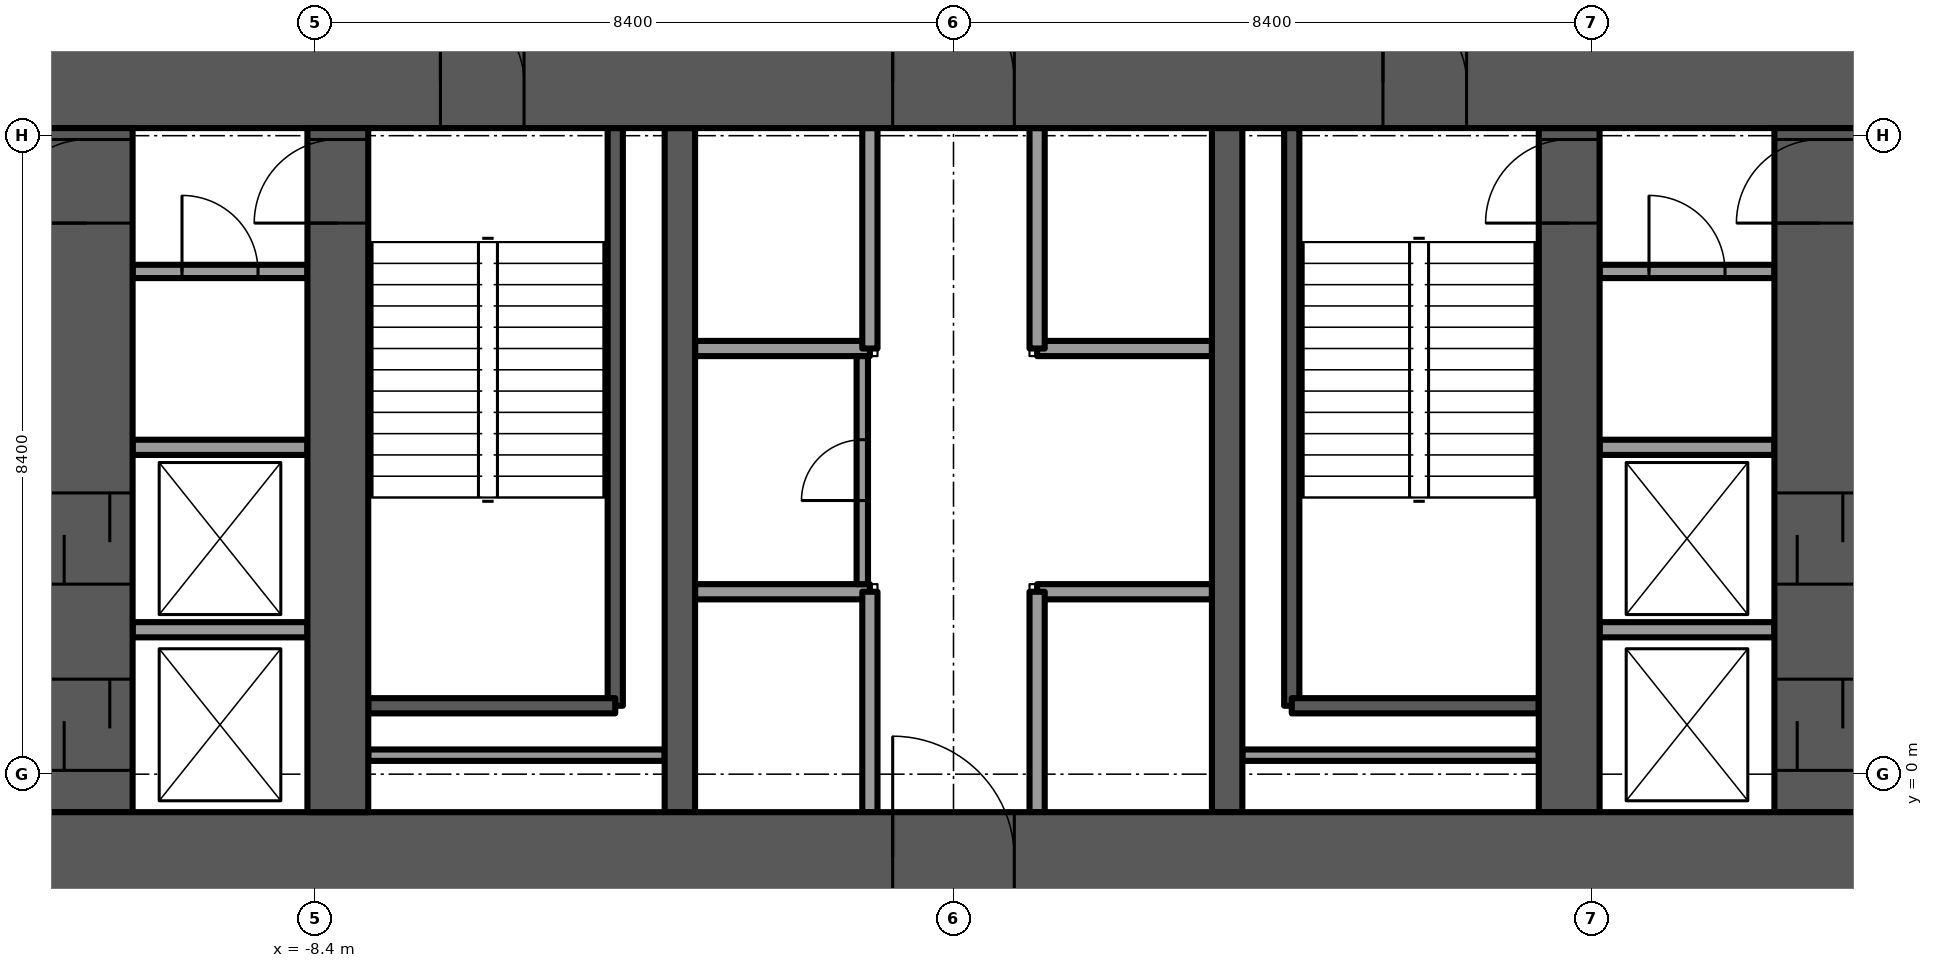
"""IFC4 building model, lengths in metres.
Left out: names, types, materials, properties, quantities, classifications, styles, units other than length and angle.
Written with IfcOpenShell. Run it as: python <this file> out.ifc"""

import sys

from ifc_helpers import new_model, si_unit, direction, frame, frame_2d, origin, place, context, subcontext, project, spatial, rectangle, extrude, element, fill, save


model = new_model("IFC4")
c1 = context("Model", 3, precision=1e-05, world=origin(), true_north=direction((0.0, 1.0)))
c2 = subcontext(c1, "Body", "Model", "MODEL_VIEW")
j1 = project(units=[si_unit("LENGTHUNIT", "METRE"), si_unit("PLANEANGLEUNIT", "RADIAN")], contexts=[c1])
p1 = place(None, origin())
s1 = spatial("IfcSite", under=j1, at=p1, CompositionType="ELEMENT")
p2 = place(p1, origin())
s2 = spatial("IfcBuilding", under=s1, at=p2, CompositionType="ELEMENT")
p3 = place(p2, frame((0.0, 0.0, 23.5)))
s3 = spatial("IfcBuildingStorey", under=s2, at=p3, CompositionType="ELEMENT", Elevation=23.5)
p4 = place(p3, frame((-12.0, -1.1, -0.3), z_axis=(0.0, 0.0, 1.0), x_axis=(1.0, 0.0, 0.0)))
e1 = element("IfcWall", 1, at=p4, inside=s3, PredefinedType="SHEAR", context=c2, shape_type="SweptSolid", body=[
    extrude(rectangle(XDim=24.0, YDim=1.2, at=frame_2d((12.0, 0.0))), origin(), (0.0, 0.0, 1.0), 4.5),
])
p5 = place(p4, frame((11.2, 0.0, 0.0)))
e2 = element("IfcOpeningElement", 2, at=p5, cuts=e1, PredefinedType="OPENING", context=c2, shape_type="SweptSolid", body=[
    extrude(rectangle(XDim=1.6, YDim=2.1, at=frame_2d((0.8, 1.05))), frame((0.0, 0.6, 0.0), z_axis=(0.0, -1.0, 0.0), x_axis=(1.0, 0.0, 0.0)), (0.0, 0.0, 1.0), 1.2),
])
p6 = place(p3, frame((-12.0, 9.1, -0.3), z_axis=(0.0, 0.0, 1.0), x_axis=(1.0, 0.0, 0.0)))
e3 = element("IfcWall", 3, at=p6, inside=s3, PredefinedType="SHEAR", context=c2, shape_type="SweptSolid", body=[
    extrude(rectangle(XDim=24.0, YDim=1.2, at=frame_2d((12.0, 0.0))), origin(), (0.0, 0.0, 1.0), 4.5),
])
p7 = place(p6, frame((11.2, 0.0, 0.0)))
e4 = element("IfcOpeningElement", 4, at=p7, cuts=e3, PredefinedType="OPENING", context=c2, shape_type="SweptSolid", body=[
    extrude(rectangle(XDim=1.6, YDim=2.1, at=frame_2d((0.8, 1.05))), frame((0.0, 0.6, 0.0), z_axis=(0.0, -1.0, 0.0), x_axis=(1.0, 0.0, 0.0)), (0.0, 0.0, 1.0), 1.2),
])
p8 = place(p6, frame((5.25, 0.0, 0.0)))
e5 = element("IfcOpeningElement", 5, at=p8, cuts=e3, PredefinedType="OPENING", context=c2, shape_type="SweptSolid", body=[
    extrude(rectangle(XDim=1.1, YDim=2.1, at=frame_2d((0.55, 1.05))), frame((0.0, 0.6, 0.0), z_axis=(0.0, -1.0, 0.0), x_axis=(1.0, 0.0, 0.0)), (0.0, 0.0, 1.0), 1.2),
])
p9 = place(p6, frame((17.65, 0.0, 0.0)))
e6 = element("IfcOpeningElement", 6, at=p9, cuts=e3, PredefinedType="OPENING", context=c2, shape_type="SweptSolid", body=[
    extrude(rectangle(XDim=1.1, YDim=2.1, at=frame_2d((0.55, 1.05))), frame((0.0, 0.6, 0.0), z_axis=(0.0, -1.0, 0.0), x_axis=(1.0, 0.0, 0.0)), (0.0, 0.0, 1.0), 1.2),
])
p10 = place(p3, frame((-8.1, -0.5, -0.3), z_axis=(0.0, 0.0, 1.0), x_axis=(0.0, 1.0, 0.0)))
e7 = element("IfcWall", 7, at=p10, inside=s3, PredefinedType="SHEAR", context=c2, shape_type="SweptSolid", body=[
    extrude(rectangle(XDim=9.0, YDim=0.8, at=frame_2d((4.5, 0.0))), origin(), (0.0, 0.0, 1.0), 4.5),
])
p11 = place(p10, frame((7.75, 0.0, 0.0)))
e8 = element("IfcOpeningElement", 8, at=p11, cuts=e7, PredefinedType="OPENING", context=c2, shape_type="SweptSolid", body=[
    extrude(rectangle(XDim=1.1, YDim=2.1, at=frame_2d((0.55, 1.05))), frame((0.0, 0.4, 0.0), z_axis=(0.0, -1.0, 0.0), x_axis=(1.0, 0.0, 0.0)), (0.0, 0.0, 1.0), 0.8),
])
p12 = place(p3, frame((8.1, -0.5, -0.3), z_axis=(0.0, 0.0, 1.0), x_axis=(0.0, 1.0, 0.0)))
e9 = element("IfcWall", 9, at=p12, inside=s3, PredefinedType="SHEAR", context=c2, shape_type="SweptSolid", body=[
    extrude(rectangle(XDim=9.0, YDim=0.8, at=frame_2d((4.5, 0.0))), origin(), (0.0, 0.0, 1.0), 4.5),
])
p13 = place(p12, frame((7.75, 0.0, 0.0)))
e10 = element("IfcOpeningElement", 10, at=p13, cuts=e9, PredefinedType="OPENING", context=c2, shape_type="SweptSolid", body=[
    extrude(rectangle(XDim=1.1, YDim=2.1, at=frame_2d((0.55, 1.05))), frame((0.0, 0.4, 0.0), z_axis=(0.0, -1.0, 0.0), x_axis=(1.0, 0.0, 0.0)), (0.0, 0.0, 1.0), 0.8),
])
for number, where, z_axis, x_axis in (
    (11, (-3.6, -0.5, -0.3), (0.0, 0.0, 1.0), (0.0, 1.0, 0.0)),
    (12, (3.6, -0.5, -0.3), (0.0, 0.0, 1.0), (0.0, 1.0, 0.0)),
):
    element("IfcWall", number, at=place(p3, frame(where, z_axis=z_axis, x_axis=x_axis)), inside=s3, PredefinedType="SHEAR", context=c2, shape_type="SweptSolid", body=[
        extrude(rectangle(XDim=9.0, YDim=0.4, at=frame_2d((4.5, 0.0))), origin(), (0.0, 0.0, 1.0), 4.5),
    ])
p14 = place(p3, frame((-11.4, -0.5, -0.3), z_axis=(0.0, 0.0, 1.0), x_axis=(0.0, 1.0, 0.0)))
e13 = element("IfcWall", 13, at=p14, inside=s3, PredefinedType="SHEAR", context=c2, shape_type="SweptSolid", body=[
    extrude(rectangle(XDim=9.0, YDim=1.2, at=frame_2d((4.5, 0.0))), origin(), (0.0, 0.0, 1.0), 4.5),
])
p15 = place(p14, frame((7.75, 0.0, 0.0)))
e14 = element("IfcOpeningElement", 14, at=p15, cuts=e13, PredefinedType="OPENING", context=c2, shape_type="SweptSolid", body=[
    extrude(rectangle(XDim=1.1, YDim=2.1, at=frame_2d((0.55, 1.05))), frame((0.0, 0.6, 0.0), z_axis=(0.0, -1.0, 0.0), x_axis=(1.0, 0.0, 0.0)), (0.0, 0.0, 1.0), 1.2),
])
p16 = place(p14, frame((0.55, 0.0, 0.0)))
e15 = element("IfcOpeningElement", 15, at=p16, cuts=e13, PredefinedType="OPENING", context=c2, shape_type="SweptSolid", body=[
    extrude(rectangle(XDim=1.2, YDim=2.1, at=frame_2d((0.6, 1.05))), frame((0.0, 0.6, 0.0), z_axis=(0.0, -1.0, 0.0), x_axis=(1.0, 0.0, 0.0)), (0.0, 0.0, 1.0), 1.2),
])
p17 = place(p14, frame((3.0, 0.0, 0.0)))
e16 = element("IfcOpeningElement", 16, at=p17, cuts=e13, PredefinedType="OPENING", context=c2, shape_type="SweptSolid", body=[
    extrude(rectangle(XDim=1.2, YDim=2.1, at=frame_2d((0.6, 1.05))), frame((0.0, 0.6, 0.0), z_axis=(0.0, -1.0, 0.0), x_axis=(1.0, 0.0, 0.0)), (0.0, 0.0, 1.0), 1.2),
])
p18 = place(p3, frame((11.4, -0.5, -0.3), z_axis=(0.0, 0.0, 1.0), x_axis=(0.0, 1.0, 0.0)))
e17 = element("IfcWall", 17, at=p18, inside=s3, PredefinedType="SHEAR", context=c2, shape_type="SweptSolid", body=[
    extrude(rectangle(XDim=9.0, YDim=1.2, at=frame_2d((4.5, 0.0))), origin(), (0.0, 0.0, 1.0), 4.5),
])
p19 = place(p18, frame((7.75, 0.0, 0.0)))
e18 = element("IfcOpeningElement", 18, at=p19, cuts=e17, PredefinedType="OPENING", context=c2, shape_type="SweptSolid", body=[
    extrude(rectangle(XDim=1.1, YDim=2.1, at=frame_2d((0.55, 1.05))), frame((0.0, 0.6, 0.0), z_axis=(0.0, -1.0, 0.0), x_axis=(1.0, 0.0, 0.0)), (0.0, 0.0, 1.0), 1.2),
])
p20 = place(p18, frame((0.55, 0.0, 0.0)))
e19 = element("IfcOpeningElement", 19, at=p20, cuts=e17, PredefinedType="OPENING", context=c2, shape_type="SweptSolid", body=[
    extrude(rectangle(XDim=1.2, YDim=2.1, at=frame_2d((0.6, 1.05))), frame((0.0, 0.6, 0.0), z_axis=(0.0, -1.0, 0.0), x_axis=(1.0, 0.0, 0.0)), (0.0, 0.0, 1.0), 1.2),
])
p21 = place(p18, frame((3.0, 0.0, 0.0)))
e20 = element("IfcOpeningElement", 20, at=p21, cuts=e17, PredefinedType="OPENING", context=c2, shape_type="SweptSolid", body=[
    extrude(rectangle(XDim=1.2, YDim=2.1, at=frame_2d((0.6, 1.05))), frame((0.0, 0.6, 0.0), z_axis=(0.0, -1.0, 0.0), x_axis=(1.0, 0.0, 0.0)), (0.0, 0.0, 1.0), 1.2),
])
for number, where, z_axis, x_axis in (
    (21, (-3.4, 2.4, 0.0), (0.0, 0.0, 1.0), (1.0, 0.0, 0.0)),
    (22, (-3.4, 5.6, 0.0), (0.0, 0.0, 1.0), (1.0, 0.0, 0.0)),
    (23, (1.1, 2.4, 0.0), (0.0, 0.0, 1.0), (1.0, 0.0, 0.0)),
    (24, (1.1, 5.6, 0.0), (0.0, 0.0, 1.0), (1.0, 0.0, 0.0)),
):
    element("IfcWall", number, at=place(p3, frame(where, z_axis=z_axis, x_axis=x_axis)), inside=s3, PredefinedType="PARTITIONING", context=c2, shape_type="SweptSolid", body=[
        extrude(rectangle(XDim=2.3, YDim=0.2, at=frame_2d((1.15, 0.0))), origin(), (0.0, 0.0, 1.0), 4.2),
    ])
for number, where, z_axis, x_axis in (
    (25, (-1.1, -0.5, 0.0), (0.0, 0.0, 1.0), (0.0, 1.0, 0.0)),
    (26, (1.1, -0.5, 0.0), (0.0, 0.0, 1.0), (0.0, 1.0, 0.0)),
    (27, (-1.1, 5.6, 0.0), (0.0, 0.0, 1.0), (0.0, 1.0, 0.0)),
    (28, (1.1, 5.6, 0.0), (0.0, 0.0, 1.0), (0.0, 1.0, 0.0)),
):
    element("IfcWall", number, at=place(p3, frame(where, z_axis=z_axis, x_axis=x_axis)), inside=s3, PredefinedType="PARTITIONING", context=c2, shape_type="SweptSolid", body=[
        extrude(rectangle(XDim=2.9, YDim=0.2, at=frame_2d((1.45, 0.0))), origin(), (0.0, 0.0, 1.0), 4.2),
    ])
p22 = place(p3, frame((-4.45, 0.9, -0.3), z_axis=(0.0, 0.0, 1.0), x_axis=(0.0, 1.0, 0.0)))
e29 = element("IfcWall", 29, at=p22, inside=s3, PredefinedType="SOLIDWALL", context=c2, shape_type="SweptSolid", body=[
    extrude(rectangle(XDim=7.6, YDim=0.2, at=frame_2d((3.8, 0.0))), origin(), (0.0, 0.0, 1.0), 4.5),
])
p23 = place(p3, frame((-7.7, 0.9, -0.3), z_axis=(0.0, 0.0, 1.0), x_axis=(1.0, 0.0, 0.0)))
e30 = element("IfcWall", 30, at=p23, inside=s3, PredefinedType="SOLIDWALL", context=c2, shape_type="SweptSolid", body=[
    extrude(rectangle(XDim=3.25, YDim=0.2, at=frame_2d((1.625, 0.0))), origin(), (0.0, 0.0, 1.0), 4.5),
])
p24 = place(p3, frame((-7.7, 0.25, 0.0), z_axis=(0.0, 0.0, 1.0), x_axis=(1.0, 0.0, 0.0)))
e31 = element("IfcWall", 31, at=p24, inside=s3, PredefinedType="PARTITIONING", context=c2, shape_type="SweptSolid", body=[
    extrude(rectangle(XDim=3.9, YDim=0.15, at=frame_2d((1.95, 0.0))), origin(), (0.0, 0.0, 1.0), 4.2),
])
p25 = place(p3, frame((4.45, 0.9, -0.3), z_axis=(0.0, 0.0, 1.0), x_axis=(0.0, 1.0, 0.0)))
e32 = element("IfcWall", 32, at=p25, inside=s3, PredefinedType="SOLIDWALL", context=c2, shape_type="SweptSolid", body=[
    extrude(rectangle(XDim=7.6, YDim=0.2, at=frame_2d((3.8, 0.0))), origin(), (0.0, 0.0, 1.0), 4.5),
])
p26 = place(p3, frame((4.45, 0.9, -0.3), z_axis=(0.0, 0.0, 1.0), x_axis=(1.0, 0.0, 0.0)))
e33 = element("IfcWall", 33, at=p26, inside=s3, PredefinedType="SOLIDWALL", context=c2, shape_type="SweptSolid", body=[
    extrude(rectangle(XDim=3.25, YDim=0.2, at=frame_2d((1.625, 0.0))), origin(), (0.0, 0.0, 1.0), 4.5),
])
p27 = place(p3, frame((3.8, 0.25, 0.0), z_axis=(0.0, 0.0, 1.0), x_axis=(1.0, 0.0, 0.0)))
e34 = element("IfcWall", 34, at=p27, inside=s3, PredefinedType="PARTITIONING", context=c2, shape_type="SweptSolid", body=[
    extrude(rectangle(XDim=3.9, YDim=0.15, at=frame_2d((1.95, 0.0))), origin(), (0.0, 0.0, 1.0), 4.2),
])
p28 = place(p3, frame((-1.2, 2.5, 0.0), z_axis=(0.0, 0.0, 1.0), x_axis=(0.0, 1.0, 0.0)))
e35 = element("IfcWall", 35, at=p28, inside=s3, PredefinedType="PARTITIONING", context=c2, shape_type="SweptSolid", body=[
    extrude(rectangle(XDim=3.0, YDim=0.15, at=frame_2d((1.5, 0.0))), origin(), (0.0, 0.0, 1.0), 4.2),
])
p29 = place(p28, frame((1.1, 0.0, 0.0)))
e36 = element("IfcOpeningElement", 36, at=p29, cuts=e35, PredefinedType="OPENING", context=c2, shape_type="SweptSolid", body=[
    extrude(rectangle(XDim=0.8, YDim=2.1, at=frame_2d((0.4, 1.05))), frame((0.0, 0.075, 0.0), z_axis=(0.0, -1.0, 0.0), x_axis=(1.0, 0.0, 0.0)), (0.0, 0.0, 1.0), 0.15),
])
for number, where, z_axis, x_axis in (
    (37, (-10.8, 1.9, 0.0), (0.0, 0.0, 1.0), (1.0, 0.0, 0.0)),
    (38, (-10.8, 4.3, 0.0), (0.0, 0.0, 1.0), (1.0, 0.0, 0.0)),
):
    element("IfcWall", number, at=place(p3, frame(where, z_axis=z_axis, x_axis=x_axis)), inside=s3, PredefinedType="PARTITIONING", context=c2, shape_type="SweptSolid", body=[
        extrude(rectangle(XDim=2.3, YDim=0.2, at=frame_2d((1.15, 0.0))), origin(), (0.0, 0.0, 1.0), 4.2),
    ])
p30 = place(p3, frame((-10.8, 6.614, 0.0), z_axis=(0.0, 0.0, 1.0), x_axis=(1.0, 0.0, 0.0)))
e39 = element("IfcWall", 39, at=p30, inside=s3, PredefinedType="PARTITIONING", context=c2, shape_type="SweptSolid", body=[
    extrude(rectangle(XDim=2.3, YDim=0.175, at=frame_2d((1.15, 0.0))), origin(), (0.0, 0.0, 1.0), 4.2),
])
p31 = place(p30, frame((0.65, 0.0, 0.0)))
e40 = element("IfcOpeningElement", 40, at=p31, cuts=e39, PredefinedType="OPENING", context=c2, shape_type="SweptSolid", body=[
    extrude(rectangle(XDim=1.0, YDim=2.1, at=frame_2d((0.5, 1.05))), frame((0.0, 0.087, 0.0), z_axis=(0.0, -1.0, 0.0), x_axis=(1.0, 0.0, 0.0)), (0.0, 0.0, 1.0), 0.175),
])
for number, where, z_axis, x_axis in (
    (41, (8.5, 1.9, 0.0), (0.0, 0.0, 1.0), (1.0, 0.0, 0.0)),
    (42, (8.5, 4.3, 0.0), (0.0, 0.0, 1.0), (1.0, 0.0, 0.0)),
):
    element("IfcWall", number, at=place(p3, frame(where, z_axis=z_axis, x_axis=x_axis)), inside=s3, PredefinedType="PARTITIONING", context=c2, shape_type="SweptSolid", body=[
        extrude(rectangle(XDim=2.3, YDim=0.2, at=frame_2d((1.15, 0.0))), origin(), (0.0, 0.0, 1.0), 4.2),
    ])
p32 = place(p3, frame((8.5, 6.614, 0.0), z_axis=(0.0, 0.0, 1.0), x_axis=(1.0, 0.0, 0.0)))
e43 = element("IfcWall", 43, at=p32, inside=s3, PredefinedType="PARTITIONING", context=c2, shape_type="SweptSolid", body=[
    extrude(rectangle(XDim=2.3, YDim=0.175, at=frame_2d((1.15, 0.0))), origin(), (0.0, 0.0, 1.0), 4.2),
])
p33 = place(p32, frame((0.65, 0.0, 0.0)))
e44 = element("IfcOpeningElement", 44, at=p33, cuts=e43, PredefinedType="OPENING", context=c2, shape_type="SweptSolid", body=[
    extrude(rectangle(XDim=1.0, YDim=2.1, at=frame_2d((0.5, 1.05))), frame((0.0, 0.087, 0.0), z_axis=(0.0, -1.0, 0.0), x_axis=(1.0, 0.0, 0.0)), (0.0, 0.0, 1.0), 0.175),
])
p34 = place(p5, origin())
e45 = element("IfcDoor", 45, at=p34, inside=s3, OperationType="DOUBLE_DOOR_SINGLE_SWING", PredefinedType="DOOR", context=c2, shape_type="SweptSolid", body=[
    extrude(rectangle(XDim=1.6, YDim=2.1, at=frame_2d((0.8, 1.05))), frame((0.0, 0.025, 0.0), z_axis=(0.0, -1.0, 0.0), x_axis=(1.0, 0.0, 0.0)), (0.0, 0.0, 1.0), 0.05),
])
fill(e2, e45)
p35 = place(p7, origin())
e46 = element("IfcDoor", 46, at=p35, inside=s3, OperationType="DOUBLE_DOOR_SINGLE_SWING", PredefinedType="DOOR", context=c2, shape_type="SweptSolid", body=[
    extrude(rectangle(XDim=1.6, YDim=2.1, at=frame_2d((0.8, 1.05))), frame((0.0, 0.025, 0.0), z_axis=(0.0, -1.0, 0.0), x_axis=(1.0, 0.0, 0.0)), (0.0, 0.0, 1.0), 0.05),
])
fill(e4, e46)
p36 = place(p8, origin())
e47 = element("IfcDoor", 47, at=p36, inside=s3, OperationType="SINGLE_SWING_LEFT", PredefinedType="DOOR", context=c2, shape_type="SweptSolid", body=[
    extrude(rectangle(XDim=1.1, YDim=2.1, at=frame_2d((0.55, 1.05))), frame((0.0, 0.025, 0.0), z_axis=(0.0, -1.0, 0.0), x_axis=(1.0, 0.0, 0.0)), (0.0, 0.0, 1.0), 0.05),
])
fill(e5, e47)
p37 = place(p11, origin())
e48 = element("IfcDoor", 48, at=p37, inside=s3, OperationType="SINGLE_SWING_RIGHT", PredefinedType="DOOR", context=c2, shape_type="SweptSolid", body=[
    extrude(rectangle(XDim=1.1, YDim=2.1, at=frame_2d((0.55, 1.05))), frame((0.0, 0.025, 0.0), z_axis=(0.0, -1.0, 0.0), x_axis=(1.0, 0.0, 0.0)), (0.0, 0.0, 1.0), 0.05),
])
fill(e8, e48)
p38 = place(p9, origin())
e49 = element("IfcDoor", 49, at=p38, inside=s3, OperationType="SINGLE_SWING_RIGHT", PredefinedType="DOOR", context=c2, shape_type="SweptSolid", body=[
    extrude(rectangle(XDim=1.1, YDim=2.1, at=frame_2d((0.55, 1.05))), frame((0.0, 0.025, 0.0), z_axis=(0.0, -1.0, 0.0), x_axis=(1.0, 0.0, 0.0)), (0.0, 0.0, 1.0), 0.05),
])
fill(e6, e49)
p39 = place(p13, origin())
e50 = element("IfcDoor", 50, at=p39, inside=s3, OperationType="SINGLE_SWING_LEFT", PredefinedType="DOOR", context=c2, shape_type="SweptSolid", body=[
    extrude(rectangle(XDim=1.1, YDim=2.1, at=frame_2d((0.55, 1.05))), frame((0.0, 0.025, 0.0), z_axis=(0.0, -1.0, 0.0), x_axis=(1.0, 0.0, 0.0)), (0.0, 0.0, 1.0), 0.05),
])
fill(e10, e50)
p40 = place(p29, origin())
e51 = element("IfcDoor", 51, at=p40, inside=s3, OperationType="SINGLE_SWING_LEFT", PredefinedType="DOOR", context=c2, shape_type="SweptSolid", body=[
    extrude(rectangle(XDim=0.8, YDim=2.1, at=frame_2d((0.4, 1.05))), frame((0.0, 0.025, 0.0), z_axis=(0.0, -1.0, 0.0), x_axis=(1.0, 0.0, 0.0)), (0.0, 0.0, 1.0), 0.05),
])
fill(e36, e51)
p41 = place(p31, origin())
e52 = element("IfcDoor", 52, at=p41, inside=s3, OperationType="SINGLE_SWING_LEFT", PredefinedType="DOOR", context=c2, shape_type="SweptSolid", body=[
    extrude(rectangle(XDim=1.0, YDim=2.1, at=frame_2d((0.5, 1.05))), frame((0.0, 0.025, 0.0), z_axis=(0.0, -1.0, 0.0), x_axis=(1.0, 0.0, 0.0)), (0.0, 0.0, 1.0), 0.05),
])
fill(e40, e52)
p42 = place(p15, origin())
e53 = element("IfcDoor", 53, at=p42, inside=s3, OperationType="SINGLE_SWING_LEFT", PredefinedType="DOOR", context=c2, shape_type="SweptSolid", body=[
    extrude(rectangle(XDim=1.1, YDim=2.1, at=frame_2d((0.55, 1.05))), frame((0.0, 0.025, 0.0), z_axis=(0.0, -1.0, 0.0), x_axis=(1.0, 0.0, 0.0)), (0.0, 0.0, 1.0), 0.05),
])
fill(e14, e53)
p43 = place(p16, origin())
e54 = element("IfcDoor", 54, at=p43, inside=s3, OperationType="SLIDING_TO_LEFT", PredefinedType="DOOR", context=c2, shape_type="SweptSolid", body=[
    extrude(rectangle(XDim=1.2, YDim=2.1, at=frame_2d((0.6, 1.05))), frame((0.0, 0.025, 0.0), z_axis=(0.0, -1.0, 0.0), x_axis=(1.0, 0.0, 0.0)), (0.0, 0.0, 1.0), 0.05),
])
fill(e15, e54)
p44 = place(p17, origin())
e55 = element("IfcDoor", 55, at=p44, inside=s3, OperationType="SLIDING_TO_LEFT", PredefinedType="DOOR", context=c2, shape_type="SweptSolid", body=[
    extrude(rectangle(XDim=1.2, YDim=2.1, at=frame_2d((0.6, 1.05))), frame((0.0, 0.025, 0.0), z_axis=(0.0, -1.0, 0.0), x_axis=(1.0, 0.0, 0.0)), (0.0, 0.0, 1.0), 0.05),
])
fill(e16, e55)
p45 = place(p33, origin())
e56 = element("IfcDoor", 56, at=p45, inside=s3, OperationType="SINGLE_SWING_RIGHT", PredefinedType="DOOR", context=c2, shape_type="SweptSolid", body=[
    extrude(rectangle(XDim=1.0, YDim=2.1, at=frame_2d((0.5, 1.05))), frame((0.0, 0.025, 0.0), z_axis=(0.0, -1.0, 0.0), x_axis=(1.0, 0.0, 0.0)), (0.0, 0.0, 1.0), 0.05),
])
fill(e44, e56)
p46 = place(p19, origin())
e57 = element("IfcDoor", 57, at=p46, inside=s3, OperationType="SINGLE_SWING_RIGHT", PredefinedType="DOOR", context=c2, shape_type="SweptSolid", body=[
    extrude(rectangle(XDim=1.1, YDim=2.1, at=frame_2d((0.55, 1.05))), frame((0.0, 0.025, 0.0), z_axis=(0.0, -1.0, 0.0), x_axis=(1.0, 0.0, 0.0)), (0.0, 0.0, 1.0), 0.05),
])
fill(e18, e57)
p47 = place(p20, origin())
e58 = element("IfcDoor", 58, at=p47, inside=s3, OperationType="SLIDING_TO_LEFT", PredefinedType="DOOR", context=c2, shape_type="SweptSolid", body=[
    extrude(rectangle(XDim=1.2, YDim=2.1, at=frame_2d((0.6, 1.05))), frame((0.0, 0.025, 0.0), z_axis=(0.0, -1.0, 0.0), x_axis=(1.0, 0.0, 0.0)), (0.0, 0.0, 1.0), 0.05),
])
fill(e19, e58)
p48 = place(p21, origin())
e59 = element("IfcDoor", 59, at=p48, inside=s3, OperationType="SLIDING_TO_LEFT", PredefinedType="DOOR", context=c2, shape_type="SweptSolid", body=[
    extrude(rectangle(XDim=1.2, YDim=2.1, at=frame_2d((0.6, 1.05))), frame((0.0, 0.025, 0.0), z_axis=(0.0, -1.0, 0.0), x_axis=(1.0, 0.0, 0.0)), (0.0, 0.0, 1.0), 0.05),
])
fill(e20, e59)
save(model, sys.argv[1])
